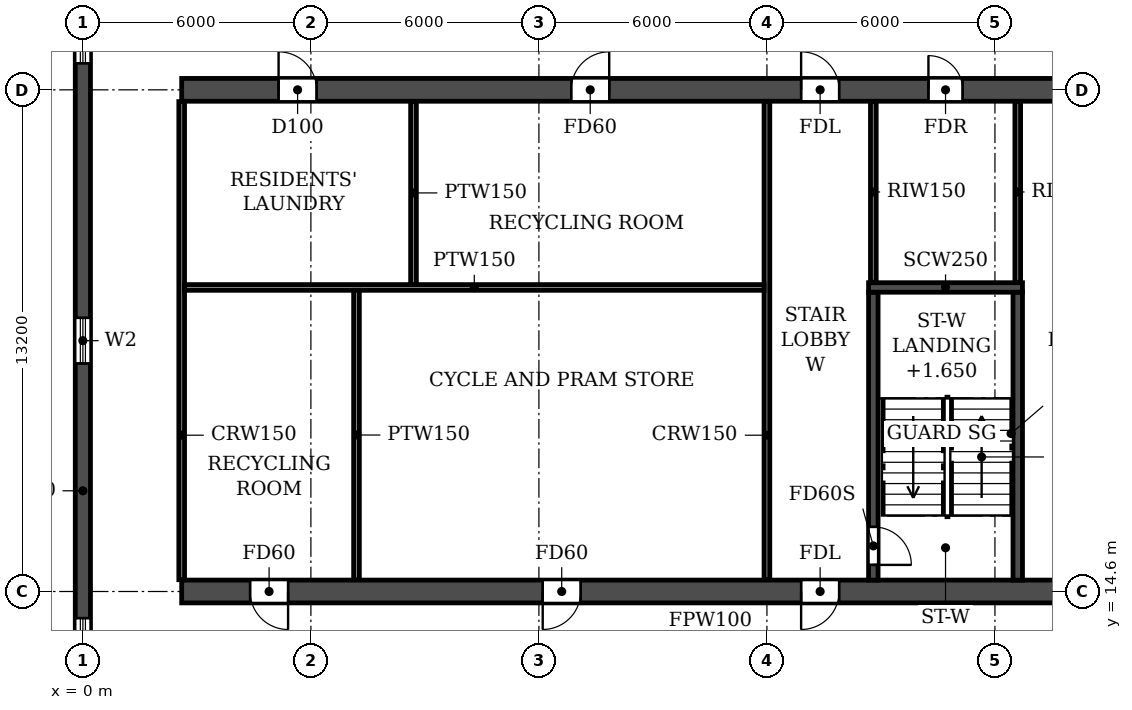
"""IFC4 building model, lengths in metres.
Left out: names, types, materials, properties, quantities, classifications, styles, units other than length and angle.
Written with IfcOpenShell. Run it as: python <this file> out.ifc"""

import sys

from ifc_helpers import new_model, si_unit, direction, frame, frame_2d, origin, place, context, subcontext, project, spatial, rectangle, extrude, element, fill, save


model = new_model("IFC4")
c1 = context("Model", 3, precision=1e-05, world=origin(), true_north=direction((0.0, 1.0)))
c2 = subcontext(c1, "Body", "Model", "MODEL_VIEW")
j1 = project(units=[si_unit("LENGTHUNIT", "METRE"), si_unit("PLANEANGLEUNIT", "RADIAN")], contexts=[c1])
p1 = place(None, origin())
s1 = spatial("IfcSite", under=j1, at=p1, CompositionType="ELEMENT")
p2 = place(p1, origin())
s2 = spatial("IfcBuilding", under=s1, at=p2, CompositionType="ELEMENT")
p3 = place(p2, frame((0.0, 0.0, 33.3)))
s3 = spatial("IfcBuildingStorey", under=s2, at=p3, CompositionType="ELEMENT", Elevation=33.3)
p4 = place(p3, frame((0.0, 4.683, 0.0), z_axis=(0.0, 0.0, 1.0), x_axis=(0.0, 1.0, 0.0)))
e1 = element("IfcWall", 1, at=p4, inside=s3, PredefinedType="SHEAR", context=c2, shape_type="SweptSolid", body=[
    extrude(rectangle(XDim=35.434, YDim=0.4, at=frame_2d((17.717, 0.0))), origin(), (0.0, 0.0, 1.0), 3.05),
])
p5 = place(p4, frame((23.817, 0.0, 0.9)))
e2 = element("IfcOpeningElement", 2, at=p5, cuts=e1, PredefinedType="OPENING", context=c2, shape_type="SweptSolid", body=[
    extrude(rectangle(XDim=1.2, YDim=1.5, at=frame_2d((0.6, 0.75))), frame((0.0, 0.21, 0.0), z_axis=(0.0, -1.0, 0.0), x_axis=(1.0, 0.0, 0.0)), (0.0, 0.0, 1.0), 0.42),
])
p6 = place(p4, frame((8.017, 0.0, 0.9)))
e3 = element("IfcOpeningElement", 3, at=p6, cuts=e1, PredefinedType="OPENING", context=c2, shape_type="SweptSolid", body=[
    extrude(rectangle(XDim=1.2, YDim=1.5, at=frame_2d((0.6, 0.75))), frame((0.0, 0.21, 0.0), z_axis=(0.0, -1.0, 0.0), x_axis=(1.0, 0.0, 0.0)), (0.0, 0.0, 1.0), 0.42),
])
p7 = place(p4, frame((15.917, 0.0, 0.9)))
e4 = element("IfcOpeningElement", 4, at=p7, cuts=e1, PredefinedType="OPENING", context=c2, shape_type="SweptSolid", body=[
    extrude(rectangle(XDim=1.2, YDim=1.5, at=frame_2d((0.6, 0.75))), frame((0.0, 0.21, 0.0), z_axis=(0.0, -1.0, 0.0), x_axis=(1.0, 0.0, 0.0)), (0.0, 0.0, 1.0), 0.42),
])
p8 = place(p4, frame((29.493, 0.0, 0.6)))
e5 = element("IfcOpeningElement", 5, at=p8, cuts=e1, PredefinedType="OPENING", context=c2, shape_type="SweptSolid", body=[
    extrude(rectangle(XDim=2.2, YDim=1.8, at=frame_2d((1.1, 0.9))), frame((0.0, 0.21, 0.0), z_axis=(0.0, -1.0, 0.0), x_axis=(1.0, 0.0, 0.0)), (0.0, 0.0, 1.0), 0.42),
])
p9 = place(p4, frame((2.541, 0.0, 0.6)))
e6 = element("IfcOpeningElement", 6, at=p9, cuts=e1, PredefinedType="OPENING", context=c2, shape_type="SweptSolid", body=[
    extrude(rectangle(XDim=2.2, YDim=1.8, at=frame_2d((1.1, 0.9))), frame((0.0, 0.21, 0.0), z_axis=(0.0, -1.0, 0.0), x_axis=(1.0, 0.0, 0.0)), (0.0, 0.0, 1.0), 0.42),
])
p10 = place(p3, frame((2.6, 14.6, 0.0), z_axis=(0.0, 0.0, 1.0), x_axis=(1.0, 0.0, 0.0)))
e7 = element("IfcWall", 7, at=p10, inside=s3, PredefinedType="SOLIDWALL", context=c2, shape_type="SweptSolid", body=[
    extrude(rectangle(XDim=96.8, YDim=0.6, at=frame_2d((48.4, 0.0))), origin(), (0.0, 0.0, 1.0), 3.05),
])
p11 = place(p10, frame((1.8, 0.0, 0.0)))
e8 = element("IfcOpeningElement", 8, at=p11, cuts=e7, PredefinedType="OPENING", context=c2, shape_type="SweptSolid", body=[
    extrude(rectangle(XDim=1.0, YDim=2.1, at=frame_2d((0.5, 1.05))), frame((0.0, 0.31, 0.0), z_axis=(0.0, -1.0, 0.0), x_axis=(1.0, 0.0, 0.0)), (0.0, 0.0, 1.0), 0.62),
])
p12 = place(p10, frame((9.5, 0.0, 0.0)))
e9 = element("IfcOpeningElement", 9, at=p12, cuts=e7, PredefinedType="OPENING", context=c2, shape_type="SweptSolid", body=[
    extrude(rectangle(XDim=1.0, YDim=2.1, at=frame_2d((0.5, 1.05))), frame((0.0, 0.31, 0.0), z_axis=(0.0, -1.0, 0.0), x_axis=(1.0, 0.0, 0.0)), (0.0, 0.0, 1.0), 0.62),
])
p13 = place(p10, frame((16.3, 0.0, 0.0)))
e10 = element("IfcOpeningElement", 10, at=p13, cuts=e7, PredefinedType="OPENING", context=c2, shape_type="SweptSolid", body=[
    extrude(rectangle(XDim=1.0, YDim=2.1, at=frame_2d((0.5, 1.05))), frame((0.0, 0.31, 0.0), z_axis=(0.0, -1.0, 0.0), x_axis=(1.0, 0.0, 0.0)), (0.0, 0.0, 1.0), 0.62),
])
p14 = place(p10, frame((24.2, 0.0, 0.0)))
e11 = element("IfcOpeningElement", 11, at=p14, cuts=e7, PredefinedType="OPENING", context=c2, shape_type="SweptSolid", body=[
    extrude(rectangle(XDim=1.0, YDim=2.1, at=frame_2d((0.5, 1.05))), frame((0.0, 0.31, 0.0), z_axis=(0.0, -1.0, 0.0), x_axis=(1.0, 0.0, 0.0)), (0.0, 0.0, 1.0), 0.62),
])
p15 = place(p10, frame((28.8, 0.0, 0.0)))
e12 = element("IfcOpeningElement", 12, at=p15, cuts=e7, PredefinedType="OPENING", context=c2, shape_type="SweptSolid", body=[
    extrude(rectangle(XDim=1.0, YDim=2.1, at=frame_2d((0.5, 1.05))), frame((0.0, 0.31, 0.0), z_axis=(0.0, -1.0, 0.0), x_axis=(1.0, 0.0, 0.0)), (0.0, 0.0, 1.0), 0.62),
])
p16 = place(p10, frame((42.7, 0.0, 0.0)))
e13 = element("IfcOpeningElement", 13, at=p16, cuts=e7, PredefinedType="OPENING", context=c2, shape_type="SweptSolid", body=[
    extrude(rectangle(XDim=1.0, YDim=2.1, at=frame_2d((0.5, 1.05))), frame((0.0, 0.31, 0.0), z_axis=(0.0, -1.0, 0.0), x_axis=(1.0, 0.0, 0.0)), (0.0, 0.0, 1.0), 0.62),
])
p17 = place(p10, frame((47.9, 0.0, 0.0)))
e14 = element("IfcOpeningElement", 14, at=p17, cuts=e7, PredefinedType="OPENING", context=c2, shape_type="SweptSolid", body=[
    extrude(rectangle(XDim=1.0, YDim=2.1, at=frame_2d((0.5, 1.05))), frame((0.0, 0.31, 0.0), z_axis=(0.0, -1.0, 0.0), x_axis=(1.0, 0.0, 0.0)), (0.0, 0.0, 1.0), 0.62),
])
p18 = place(p10, frame((53.1, 0.0, 0.0)))
e15 = element("IfcOpeningElement", 15, at=p18, cuts=e7, PredefinedType="OPENING", context=c2, shape_type="SweptSolid", body=[
    extrude(rectangle(XDim=1.0, YDim=2.1, at=frame_2d((0.5, 1.05))), frame((0.0, 0.31, 0.0), z_axis=(0.0, -1.0, 0.0), x_axis=(1.0, 0.0, 0.0)), (0.0, 0.0, 1.0), 0.62),
])
p19 = place(p10, frame((67.0, 0.0, 0.0)))
e16 = element("IfcOpeningElement", 16, at=p19, cuts=e7, PredefinedType="OPENING", context=c2, shape_type="SweptSolid", body=[
    extrude(rectangle(XDim=1.0, YDim=2.1, at=frame_2d((0.5, 1.05))), frame((0.0, 0.31, 0.0), z_axis=(0.0, -1.0, 0.0), x_axis=(1.0, 0.0, 0.0)), (0.0, 0.0, 1.0), 0.62),
])
p20 = place(p10, frame((71.6, 0.0, 0.0)))
e17 = element("IfcOpeningElement", 17, at=p20, cuts=e7, PredefinedType="OPENING", context=c2, shape_type="SweptSolid", body=[
    extrude(rectangle(XDim=1.0, YDim=2.1, at=frame_2d((0.5, 1.05))), frame((0.0, 0.31, 0.0), z_axis=(0.0, -1.0, 0.0), x_axis=(1.0, 0.0, 0.0)), (0.0, 0.0, 1.0), 0.62),
])
p21 = place(p10, frame((79.5, 0.0, 0.0)))
e18 = element("IfcOpeningElement", 18, at=p21, cuts=e7, PredefinedType="OPENING", context=c2, shape_type="SweptSolid", body=[
    extrude(rectangle(XDim=1.0, YDim=2.1, at=frame_2d((0.5, 1.05))), frame((0.0, 0.31, 0.0), z_axis=(0.0, -1.0, 0.0), x_axis=(1.0, 0.0, 0.0)), (0.0, 0.0, 1.0), 0.62),
])
p22 = place(p10, frame((88.6, 0.0, 0.0)))
e19 = element("IfcOpeningElement", 19, at=p22, cuts=e7, PredefinedType="OPENING", context=c2, shape_type="SweptSolid", body=[
    extrude(rectangle(XDim=1.0, YDim=2.1, at=frame_2d((0.5, 1.05))), frame((0.0, 0.31, 0.0), z_axis=(0.0, -1.0, 0.0), x_axis=(1.0, 0.0, 0.0)), (0.0, 0.0, 1.0), 0.62),
])
p23 = place(p3, frame((2.6, 27.8, 0.0), z_axis=(0.0, 0.0, 1.0), x_axis=(1.0, 0.0, 0.0)))
e20 = element("IfcWall", 20, at=p23, inside=s3, PredefinedType="SOLIDWALL", context=c2, shape_type="SweptSolid", body=[
    extrude(rectangle(XDim=96.8, YDim=0.6, at=frame_2d((48.4, 0.0))), origin(), (0.0, 0.0, 1.0), 3.05),
])
p24 = place(p23, frame((2.55, 0.0, 0.0)))
e21 = element("IfcOpeningElement", 21, at=p24, cuts=e20, PredefinedType="OPENING", context=c2, shape_type="SweptSolid", body=[
    extrude(rectangle(XDim=1.0, YDim=2.1, at=frame_2d((0.5, 1.05))), frame((0.0, 0.31, 0.0), z_axis=(0.0, -1.0, 0.0), x_axis=(1.0, 0.0, 0.0)), (0.0, 0.0, 1.0), 0.62),
])
p25 = place(p23, frame((10.25, 0.0, 0.0)))
e22 = element("IfcOpeningElement", 22, at=p25, cuts=e20, PredefinedType="OPENING", context=c2, shape_type="SweptSolid", body=[
    extrude(rectangle(XDim=1.0, YDim=2.1, at=frame_2d((0.5, 1.05))), frame((0.0, 0.31, 0.0), z_axis=(0.0, -1.0, 0.0), x_axis=(1.0, 0.0, 0.0)), (0.0, 0.0, 1.0), 0.62),
])
p26 = place(p23, frame((16.3, 0.0, 0.0)))
e23 = element("IfcOpeningElement", 23, at=p26, cuts=e20, PredefinedType="OPENING", context=c2, shape_type="SweptSolid", body=[
    extrude(rectangle(XDim=1.0, YDim=2.1, at=frame_2d((0.5, 1.05))), frame((0.0, 0.31, 0.0), z_axis=(0.0, -1.0, 0.0), x_axis=(1.0, 0.0, 0.0)), (0.0, 0.0, 1.0), 0.62),
])
p27 = place(p23, frame((19.65, 0.0, 0.0)))
e24 = element("IfcOpeningElement", 24, at=p27, cuts=e20, PredefinedType="OPENING", context=c2, shape_type="SweptSolid", body=[
    extrude(rectangle(XDim=0.9, YDim=2.1, at=frame_2d((0.45, 1.05))), frame((0.0, 0.31, 0.0), z_axis=(0.0, -1.0, 0.0), x_axis=(1.0, 0.0, 0.0)), (0.0, 0.0, 1.0), 0.62),
])
p28 = place(p23, frame((28.85, 0.0, 0.0)))
e25 = element("IfcOpeningElement", 25, at=p28, cuts=e20, PredefinedType="OPENING", context=c2, shape_type="SweptSolid", body=[
    extrude(rectangle(XDim=0.9, YDim=2.1, at=frame_2d((0.45, 1.05))), frame((0.0, 0.31, 0.0), z_axis=(0.0, -1.0, 0.0), x_axis=(1.0, 0.0, 0.0)), (0.0, 0.0, 1.0), 0.62),
])
p29 = place(p23, frame((34.6, 0.0, 0.0)))
e26 = element("IfcOpeningElement", 26, at=p29, cuts=e20, PredefinedType="OPENING", context=c2, shape_type="SweptSolid", body=[
    extrude(rectangle(XDim=1.0, YDim=2.1, at=frame_2d((0.5, 1.05))), frame((0.0, 0.31, 0.0), z_axis=(0.0, -1.0, 0.0), x_axis=(1.0, 0.0, 0.0)), (0.0, 0.0, 1.0), 0.62),
])
p30 = place(p23, frame((39.8, 0.0, 0.0)))
e27 = element("IfcOpeningElement", 27, at=p30, cuts=e20, PredefinedType="OPENING", context=c2, shape_type="SweptSolid", body=[
    extrude(rectangle(XDim=1.0, YDim=2.1, at=frame_2d((0.5, 1.05))), frame((0.0, 0.31, 0.0), z_axis=(0.0, -1.0, 0.0), x_axis=(1.0, 0.0, 0.0)), (0.0, 0.0, 1.0), 0.62),
])
p31 = place(p23, frame((45.0, 0.0, 0.0)))
e28 = element("IfcOpeningElement", 28, at=p31, cuts=e20, PredefinedType="OPENING", context=c2, shape_type="SweptSolid", body=[
    extrude(rectangle(XDim=1.0, YDim=2.1, at=frame_2d((0.5, 1.05))), frame((0.0, 0.31, 0.0), z_axis=(0.0, -1.0, 0.0), x_axis=(1.0, 0.0, 0.0)), (0.0, 0.0, 1.0), 0.62),
])
p32 = place(p23, frame((47.9, 0.0, 0.0)))
e29 = element("IfcOpeningElement", 29, at=p32, cuts=e20, PredefinedType="OPENING", context=c2, shape_type="SweptSolid", body=[
    extrude(rectangle(XDim=1.0, YDim=2.1, at=frame_2d((0.5, 1.05))), frame((0.0, 0.31, 0.0), z_axis=(0.0, -1.0, 0.0), x_axis=(1.0, 0.0, 0.0)), (0.0, 0.0, 1.0), 0.62),
])
p33 = place(p23, frame((50.8, 0.0, 0.0)))
e30 = element("IfcOpeningElement", 30, at=p33, cuts=e20, PredefinedType="OPENING", context=c2, shape_type="SweptSolid", body=[
    extrude(rectangle(XDim=1.0, YDim=2.1, at=frame_2d((0.5, 1.05))), frame((0.0, 0.31, 0.0), z_axis=(0.0, -1.0, 0.0), x_axis=(1.0, 0.0, 0.0)), (0.0, 0.0, 1.0), 0.62),
])
p34 = place(p23, frame((54.7, 0.0, 0.0)))
e31 = element("IfcOpeningElement", 31, at=p34, cuts=e20, PredefinedType="OPENING", context=c2, shape_type="SweptSolid", body=[
    extrude(rectangle(XDim=1.0, YDim=2.1, at=frame_2d((0.5, 1.05))), frame((0.0, 0.31, 0.0), z_axis=(0.0, -1.0, 0.0), x_axis=(1.0, 0.0, 0.0)), (0.0, 0.0, 1.0), 0.62),
])
p35 = place(p23, frame((61.2, 0.0, 0.0)))
e32 = element("IfcOpeningElement", 32, at=p35, cuts=e20, PredefinedType="OPENING", context=c2, shape_type="SweptSolid", body=[
    extrude(rectangle(XDim=1.0, YDim=2.1, at=frame_2d((0.5, 1.05))), frame((0.0, 0.31, 0.0), z_axis=(0.0, -1.0, 0.0), x_axis=(1.0, 0.0, 0.0)), (0.0, 0.0, 1.0), 0.62),
])
p36 = place(p23, frame((67.05, 0.0, 0.0)))
e33 = element("IfcOpeningElement", 33, at=p36, cuts=e20, PredefinedType="OPENING", context=c2, shape_type="SweptSolid", body=[
    extrude(rectangle(XDim=0.9, YDim=2.1, at=frame_2d((0.45, 1.05))), frame((0.0, 0.31, 0.0), z_axis=(0.0, -1.0, 0.0), x_axis=(1.0, 0.0, 0.0)), (0.0, 0.0, 1.0), 0.62),
])
p37 = place(p23, frame((76.25, 0.0, 0.0)))
e34 = element("IfcOpeningElement", 34, at=p37, cuts=e20, PredefinedType="OPENING", context=c2, shape_type="SweptSolid", body=[
    extrude(rectangle(XDim=0.9, YDim=2.1, at=frame_2d((0.45, 1.05))), frame((0.0, 0.31, 0.0), z_axis=(0.0, -1.0, 0.0), x_axis=(1.0, 0.0, 0.0)), (0.0, 0.0, 1.0), 0.62),
])
p38 = place(p23, frame((79.5, 0.0, 0.0)))
e35 = element("IfcOpeningElement", 35, at=p38, cuts=e20, PredefinedType="OPENING", context=c2, shape_type="SweptSolid", body=[
    extrude(rectangle(XDim=1.0, YDim=2.1, at=frame_2d((0.5, 1.05))), frame((0.0, 0.31, 0.0), z_axis=(0.0, -1.0, 0.0), x_axis=(1.0, 0.0, 0.0)), (0.0, 0.0, 1.0), 0.62),
])
p39 = place(p23, frame((86.05, 0.0, 0.0)))
e36 = element("IfcOpeningElement", 36, at=p39, cuts=e20, PredefinedType="OPENING", context=c2, shape_type="SweptSolid", body=[
    extrude(rectangle(XDim=1.5, YDim=2.1, at=frame_2d((0.75, 1.05))), frame((0.0, 0.31, 0.0), z_axis=(0.0, -1.0, 0.0), x_axis=(1.0, 0.0, 0.0)), (0.0, 0.0, 1.0), 0.62),
])
p40 = place(p23, frame((94.0, 0.0, 0.0)))
e37 = element("IfcOpeningElement", 37, at=p40, cuts=e20, PredefinedType="OPENING", context=c2, shape_type="SweptSolid", body=[
    extrude(rectangle(XDim=1.0, YDim=2.1, at=frame_2d((0.5, 1.05))), frame((0.0, 0.31, 0.0), z_axis=(0.0, -1.0, 0.0), x_axis=(1.0, 0.0, 0.0)), (0.0, 0.0, 1.0), 0.62),
])
p41 = place(p3, frame((20.8, 14.9, 0.0), z_axis=(0.0, 0.0, 1.0), x_axis=(0.0, 1.0, 0.0)))
e38 = element("IfcWall", 38, at=p41, inside=s3, PredefinedType="SOLIDWALL", context=c2, shape_type="SweptSolid", body=[
    extrude(rectangle(XDim=7.575, YDim=0.25, at=frame_2d((3.788, 0.0))), origin(), (0.0, 0.0, 1.0), 3.05),
])
p42 = place(p41, frame((0.4, 0.0, 0.0)))
e39 = element("IfcOpeningElement", 39, at=p42, cuts=e38, PredefinedType="OPENING", context=c2, shape_type="SweptSolid", body=[
    extrude(rectangle(XDim=1.0, YDim=2.1, at=frame_2d((0.5, 1.05))), frame((0.0, 0.135, 0.0), z_axis=(0.0, -1.0, 0.0), x_axis=(1.0, 0.0, 0.0)), (0.0, 0.0, 1.0), 0.27),
])
p43 = place(p3, frame((24.6, 14.9, 0.0), z_axis=(0.0, 0.0, 1.0), x_axis=(0.0, 1.0, 0.0)))
e40 = element("IfcWall", 40, at=p43, inside=s3, PredefinedType="SOLIDWALL", context=c2, shape_type="SweptSolid", body=[
    extrude(rectangle(XDim=7.575, YDim=0.25, at=frame_2d((3.788, 0.0))), origin(), (0.0, 0.0, 1.0), 3.05),
])
p44 = place(p3, frame((20.675, 22.6, 0.0), z_axis=(0.0, 0.0, 1.0), x_axis=(1.0, 0.0, 0.0)))
e41 = element("IfcWall", 41, at=p44, inside=s3, PredefinedType="SOLIDWALL", context=c2, shape_type="SweptSolid", body=[
    extrude(rectangle(XDim=4.05, YDim=0.25, at=frame_2d((2.025, 0.0))), origin(), (0.0, 0.0, 1.0), 3.05),
])
for number, where, z_axis, x_axis in (
    (42, (2.6, 14.91, 0.0), (0.0, 0.0, 1.0), (0.0, 1.0, 0.0)),
    (43, (18.0, 14.91, 0.0), (0.0, 0.0, 1.0), (0.0, 1.0, 0.0)),
):
    element("IfcWall", number, at=place(p3, frame(where, z_axis=z_axis, x_axis=x_axis)), inside=s3, PredefinedType="PARTITIONING", context=c2, shape_type="SweptSolid", body=[
        extrude(rectangle(XDim=12.58, YDim=0.15, at=frame_2d((6.29, 0.0))), origin(), (0.0, 0.0, 1.0), 3.05),
    ])
p45 = place(p3, frame((2.675, 22.6, 0.0), z_axis=(0.0, 0.0, 1.0), x_axis=(1.0, 0.0, 0.0)))
e44 = element("IfcWall", 44, at=p45, inside=s3, PredefinedType="PARTITIONING", context=c2, shape_type="SweptSolid", body=[
    extrude(rectangle(XDim=15.25, YDim=0.15, at=frame_2d((7.625, 0.0))), origin(), (0.0, 0.0, 1.0), 3.05),
])
p46 = place(p3, frame((7.2, 14.91, 0.0), z_axis=(0.0, 0.0, 1.0), x_axis=(0.0, 1.0, 0.0)))
e45 = element("IfcWall", 45, at=p46, inside=s3, PredefinedType="PARTITIONING", context=c2, shape_type="SweptSolid", body=[
    extrude(rectangle(XDim=7.615, YDim=0.15, at=frame_2d((3.808, 0.0))), origin(), (0.0, 0.0, 1.0), 3.05),
])
p47 = place(p3, frame((8.7, 22.675, 0.0), z_axis=(0.0, 0.0, 1.0), x_axis=(0.0, 1.0, 0.0)))
e46 = element("IfcWall", 46, at=p47, inside=s3, PredefinedType="PARTITIONING", context=c2, shape_type="SweptSolid", body=[
    extrude(rectangle(XDim=4.815, YDim=0.15, at=frame_2d((2.407, 0.0))), origin(), (0.0, 0.0, 1.0), 3.05),
])
for number, where, z_axis, x_axis in (
    (47, (20.8, 22.735, 0.0), (0.0, 0.0, 1.0), (0.0, 1.0, 0.0)),
    (48, (24.6, 22.735, 0.0), (0.0, 0.0, 1.0), (0.0, 1.0, 0.0)),
):
    element("IfcWall", number, at=place(p3, frame(where, z_axis=z_axis, x_axis=x_axis)), inside=s3, PredefinedType="PARTITIONING", context=c2, shape_type="SweptSolid", body=[
        extrude(rectangle(XDim=4.755, YDim=0.15, at=frame_2d((2.377, 0.0))), origin(), (0.0, 0.0, 1.0), 3.05),
    ])
p48 = place(p5, origin())
e49 = element("IfcWindow", 49, at=p48, inside=s3, PartitioningType="SINGLE_PANEL", PredefinedType="WINDOW", context=c2, shape_type="SweptSolid", body=[
    extrude(rectangle(XDim=1.2, YDim=1.5, at=frame_2d((0.6, 0.75))), frame((0.0, 0.03, 0.0), z_axis=(0.0, -1.0, 0.0), x_axis=(1.0, 0.0, 0.0)), (0.0, 0.0, 1.0), 0.06),
])
fill(e2, e49)
p49 = place(p6, origin())
e50 = element("IfcWindow", 50, at=p49, inside=s3, PartitioningType="SINGLE_PANEL", PredefinedType="WINDOW", context=c2, shape_type="SweptSolid", body=[
    extrude(rectangle(XDim=1.2, YDim=1.5, at=frame_2d((0.6, 0.75))), frame((0.0, 0.03, 0.0), z_axis=(0.0, -1.0, 0.0), x_axis=(1.0, 0.0, 0.0)), (0.0, 0.0, 1.0), 0.06),
])
fill(e3, e50)
p50 = place(p7, origin())
e51 = element("IfcWindow", 51, at=p50, inside=s3, PartitioningType="SINGLE_PANEL", PredefinedType="WINDOW", context=c2, shape_type="SweptSolid", body=[
    extrude(rectangle(XDim=1.2, YDim=1.5, at=frame_2d((0.6, 0.75))), frame((0.0, 0.03, 0.0), z_axis=(0.0, -1.0, 0.0), x_axis=(1.0, 0.0, 0.0)), (0.0, 0.0, 1.0), 0.06),
])
fill(e4, e51)
p51 = place(p24, origin())
e52 = element("IfcDoor", 52, at=p51, inside=s3, OperationType="SINGLE_SWING_LEFT", PredefinedType="DOOR", context=c2, shape_type="SweptSolid", body=[
    extrude(rectangle(XDim=1.0, YDim=2.1, at=frame_2d((0.5, 1.05))), frame((0.0, 0.025, 0.0), z_axis=(0.0, -1.0, 0.0), x_axis=(1.0, 0.0, 0.0)), (0.0, 0.0, 1.0), 0.05),
])
fill(e21, e52)
p52 = place(p25, origin())
e53 = element("IfcDoor", 53, at=p52, inside=s3, OperationType="SINGLE_SWING_RIGHT", PredefinedType="DOOR", context=c2, shape_type="SweptSolid", body=[
    extrude(rectangle(XDim=1.0, YDim=2.1, at=frame_2d((0.5, 1.05))), frame((0.0, 0.025, 0.0), z_axis=(0.0, -1.0, 0.0), x_axis=(1.0, 0.0, 0.0)), (0.0, 0.0, 1.0), 0.05),
])
fill(e22, e53)
p53 = place(p26, origin())
e54 = element("IfcDoor", 54, at=p53, inside=s3, OperationType="SINGLE_SWING_LEFT", PredefinedType="DOOR", context=c2, shape_type="SweptSolid", body=[
    extrude(rectangle(XDim=1.0, YDim=2.1, at=frame_2d((0.5, 1.05))), frame((0.0, 0.025, 0.0), z_axis=(0.0, -1.0, 0.0), x_axis=(1.0, 0.0, 0.0)), (0.0, 0.0, 1.0), 0.05),
])
fill(e23, e54)
p54 = place(p27, origin())
e55 = element("IfcDoor", 55, at=p54, inside=s3, OperationType="SINGLE_SWING_LEFT", PredefinedType="DOOR", context=c2, shape_type="SweptSolid", body=[
    extrude(rectangle(XDim=0.9, YDim=2.1, at=frame_2d((0.45, 1.05))), frame((0.0, 0.025, 0.0), z_axis=(0.0, -1.0, 0.0), x_axis=(1.0, 0.0, 0.0)), (0.0, 0.0, 1.0), 0.05),
])
fill(e24, e55)
p55 = place(p11, frame((1.0, 0.0, 0.0), z_axis=(0.0, 0.0, 1.0), x_axis=(-1.0, 0.0, 0.0)))
e56 = element("IfcDoor", 56, at=p55, inside=s3, OperationType="SINGLE_SWING_LEFT", PredefinedType="DOOR", context=c2, shape_type="SweptSolid", body=[
    extrude(rectangle(XDim=1.0, YDim=2.1, at=frame_2d((0.5, 1.05))), frame((0.0, 0.025, 0.0), z_axis=(0.0, -1.0, 0.0), x_axis=(1.0, 0.0, 0.0)), (0.0, 0.0, 1.0), 0.05),
])
fill(e8, e56)
p56 = place(p12, frame((1.0, 0.0, 0.0), z_axis=(0.0, 0.0, 1.0), x_axis=(-1.0, 0.0, 0.0)))
e57 = element("IfcDoor", 57, at=p56, inside=s3, OperationType="SINGLE_SWING_RIGHT", PredefinedType="DOOR", context=c2, shape_type="SweptSolid", body=[
    extrude(rectangle(XDim=1.0, YDim=2.1, at=frame_2d((0.5, 1.05))), frame((0.0, 0.025, 0.0), z_axis=(0.0, -1.0, 0.0), x_axis=(1.0, 0.0, 0.0)), (0.0, 0.0, 1.0), 0.05),
])
fill(e9, e57)
p57 = place(p13, frame((1.0, 0.0, 0.0), z_axis=(0.0, 0.0, 1.0), x_axis=(-1.0, 0.0, 0.0)))
e58 = element("IfcDoor", 58, at=p57, inside=s3, OperationType="SINGLE_SWING_RIGHT", PredefinedType="DOOR", context=c2, shape_type="SweptSolid", body=[
    extrude(rectangle(XDim=1.0, YDim=2.1, at=frame_2d((0.5, 1.05))), frame((0.0, 0.025, 0.0), z_axis=(0.0, -1.0, 0.0), x_axis=(1.0, 0.0, 0.0)), (0.0, 0.0, 1.0), 0.05),
])
fill(e10, e58)
p58 = place(p42, frame((1.0, 0.0, 0.0), z_axis=(0.0, 0.0, 1.0), x_axis=(-1.0, 0.0, 0.0)))
e59 = element("IfcDoor", 59, at=p58, inside=s3, OperationType="SINGLE_SWING_RIGHT", PredefinedType="DOOR", context=c2, shape_type="SweptSolid", body=[
    extrude(rectangle(XDim=1.0, YDim=2.1, at=frame_2d((0.5, 1.05))), frame((0.0, 0.025, 0.0), z_axis=(0.0, -1.0, 0.0), x_axis=(1.0, 0.0, 0.0)), (0.0, 0.0, 1.0), 0.05),
])
fill(e39, e59)
save(model, sys.argv[1])
